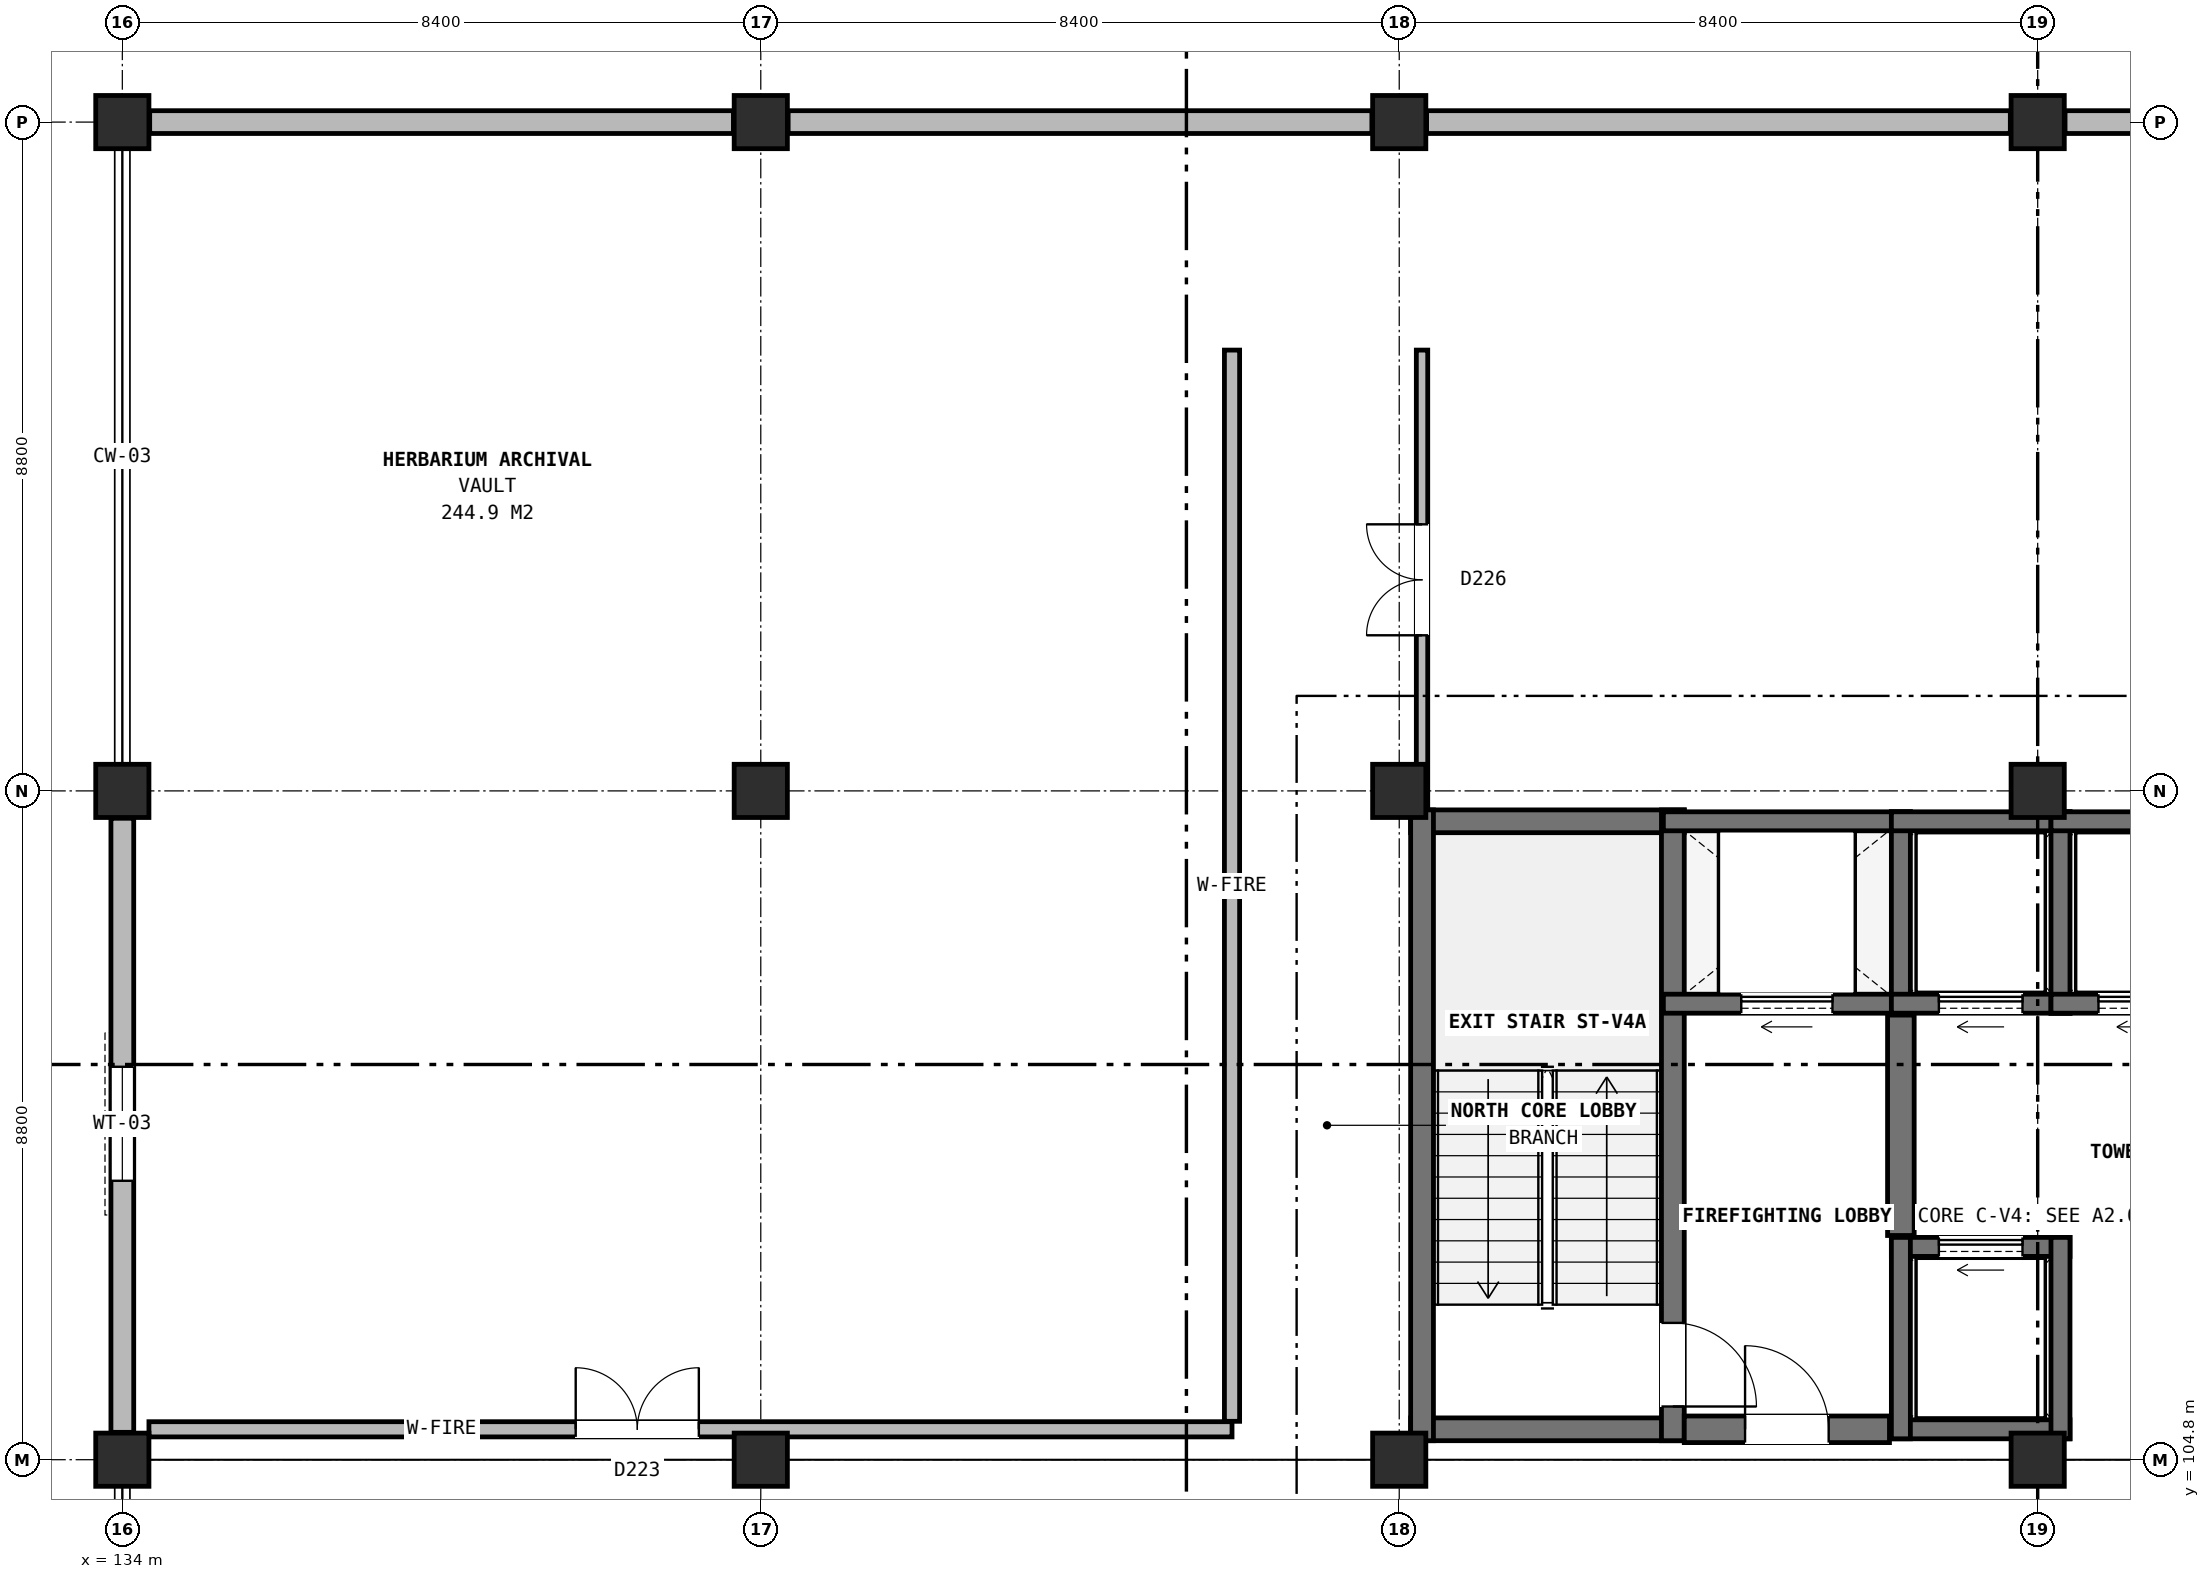
"""IFC4 building model, lengths in metres.
Left out: names, types, materials, properties, quantities, classifications, styles, units other than length and angle.
Written with IfcOpenShell. Run it as: python <this file> out.ifc"""

import sys

from ifc_helpers import new_model, si_unit, direction, frame, frame_2d, origin, origin_2d, place, context, subcontext, project, spatial, rectangle, extrude, element, fill, save


model = new_model("IFC4")
c1 = context("Model", 3, precision=1e-05, world=origin(), true_north=direction((0.0, 1.0)))
c2 = subcontext(c1, "Body", "Model", "MODEL_VIEW")
j1 = project(units=[si_unit("LENGTHUNIT", "METRE"), si_unit("PLANEANGLEUNIT", "RADIAN")], contexts=[c1])
p1 = place(None, origin())
s1 = spatial("IfcSite", under=j1, at=p1, CompositionType="ELEMENT")
p2 = place(p1, origin())
s2 = spatial("IfcBuilding", under=s1, at=p2, CompositionType="ELEMENT")
p3 = place(p2, frame((0.0, 0.0, 28.8)))
s3 = spatial("IfcBuildingStorey", under=s2, at=p3, CompositionType="ELEMENT", Elevation=28.8)
for number, where, z_axis, x_axis in (
    (1, (134.0, 104.8, 0.0), (0.0, 0.0, 1.0), (1.0, 0.0, 0.0)),
    (2, (134.0, 113.6, 0.0), (0.0, 0.0, 1.0), (1.0, 0.0, 0.0)),
    (3, (134.0, 122.4, 0.0), (0.0, 0.0, 1.0), (1.0, 0.0, 0.0)),
    (4, (142.4, 104.8, 0.0), (0.0, 0.0, 1.0), (1.0, 0.0, 0.0)),
    (5, (142.4, 113.6, 0.0), (0.0, 0.0, 1.0), (1.0, 0.0, 0.0)),
    (6, (142.4, 122.4, 0.0), (0.0, 0.0, 1.0), (1.0, 0.0, 0.0)),
    (7, (150.8, 104.8, 0.0), (0.0, 0.0, 1.0), (1.0, 0.0, 0.0)),
    (8, (150.8, 113.6, 0.0), (0.0, 0.0, 1.0), (1.0, 0.0, 0.0)),
    (9, (150.8, 122.4, 0.0), (0.0, 0.0, 1.0), (1.0, 0.0, 0.0)),
    (10, (159.2, 104.8, 0.0), (0.0, 0.0, 1.0), (1.0, 0.0, 0.0)),
    (11, (159.2, 113.6, 0.0), (0.0, 0.0, 1.0), (1.0, 0.0, 0.0)),
    (12, (159.2, 122.4, 0.0), (0.0, 0.0, 1.0), (1.0, 0.0, 0.0)),
):
    element("IfcColumn", number, at=place(p3, frame(where, z_axis=z_axis, x_axis=x_axis)), inside=s3, PredefinedType="COLUMN", context=c2, shape_type="SweptSolid", body=[
        extrude(rectangle(XDim=0.7, YDim=0.7, at=origin_2d()), origin(), (0.0, 0.0, 1.0), 4.0),
    ])
p4 = place(p3, frame((167.24, 122.4, 0.0), z_axis=(0.0, 0.0, 1.0), x_axis=(-1.0, 0.0, 0.0)))
e13 = element("IfcWall", 13, at=p4, inside=s3, PredefinedType="SOLIDWALL", context=c2, shape_type="SweptSolid", body=[
    extrude(rectangle(XDim=7.68, YDim=0.3, at=frame_2d((3.84, 0.0))), origin(), (0.0, 0.0, 1.0), 3.15),
])
p5 = place(p3, frame((158.84, 122.4, 0.0), z_axis=(0.0, 0.0, 1.0), x_axis=(-1.0, 0.0, 0.0)))
e14 = element("IfcWall", 14, at=p5, inside=s3, PredefinedType="SOLIDWALL", context=c2, shape_type="SweptSolid", body=[
    extrude(rectangle(XDim=7.68, YDim=0.3, at=frame_2d((3.84, 0.0))), origin(), (0.0, 0.0, 1.0), 3.15),
])
for number, where, z_axis, x_axis in (
    (15, (150.44, 122.4, 0.0), (0.0, 0.0, 1.0), (-1.0, 0.0, 0.0)),
    (16, (142.04, 122.4, 0.0), (0.0, 0.0, 1.0), (-1.0, 0.0, 0.0)),
):
    element("IfcWall", number, at=place(p3, frame(where, z_axis=z_axis, x_axis=x_axis)), inside=s3, PredefinedType="SOLIDWALL", context=c2, shape_type="SweptSolid", body=[
        extrude(rectangle(XDim=7.68, YDim=0.3, at=frame_2d((3.84, 0.0))), origin(), (0.0, 0.0, 1.0), 3.15),
    ])
p6 = place(p3, frame((134.0, 113.24, 0.0), z_axis=(0.0, 0.0, 1.0), x_axis=(0.0, -1.0, 0.0)))
e17 = element("IfcWall", 17, at=p6, inside=s3, PredefinedType="SOLIDWALL", context=c2, shape_type="SweptSolid", body=[
    extrude(rectangle(XDim=8.08, YDim=0.3, at=frame_2d((4.04, 0.0))), origin(), (0.0, 0.0, 1.0), 3.15),
])
p7 = place(p6, frame((3.27, 0.0, 0.9)))
e18 = element("IfcOpeningElement", 18, at=p7, cuts=e17, PredefinedType="OPENING", context=c2, shape_type="SweptSolid", body=[
    extrude(rectangle(XDim=1.5, YDim=1.8, at=frame_2d((0.75, 0.9))), frame((0.0, 0.16, 0.0), z_axis=(0.0, -1.0, 0.0), x_axis=(1.0, 0.0, 0.0)), (0.0, 0.0, 1.0), 0.32),
])
for number, where, z_axis, x_axis in (
    (19, (150.95, 105.2, 0.0), (0.0, 0.0, 1.0), (1.0, 0.0, 0.0)),
    (20, (150.95, 113.2, 0.0), (0.0, 0.0, 1.0), (1.0, 0.0, 0.0)),
):
    element("IfcWall", number, at=place(p3, frame(where, z_axis=z_axis, x_axis=x_axis)), inside=s3, PredefinedType="SHEAR", context=c2, shape_type="SweptSolid", body=[
        extrude(rectangle(XDim=3.6, YDim=0.3, at=frame_2d((1.8, 0.0))), origin(), (0.0, 0.0, 1.0), 4.0),
    ])
p8 = place(p3, frame((151.1, 105.05, 0.0), z_axis=(0.0, 0.0, 1.0), x_axis=(0.0, 1.0, 0.0)))
e21 = element("IfcWall", 21, at=p8, inside=s3, PredefinedType="SHEAR", context=c2, shape_type="SweptSolid", body=[
    extrude(rectangle(XDim=8.3, YDim=0.3, at=frame_2d((4.15, 0.0))), origin(), (0.0, 0.0, 1.0), 4.0),
])
p9 = place(p3, frame((154.4, 105.05, 0.0), z_axis=(0.0, 0.0, 1.0), x_axis=(0.0, 1.0, 0.0)))
e22 = element("IfcWall", 22, at=p9, inside=s3, PredefinedType="SHEAR", context=c2, shape_type="SweptSolid", body=[
    extrude(rectangle(XDim=8.3, YDim=0.3, at=frame_2d((4.15, 0.0))), origin(), (0.0, 0.0, 1.0), 4.0),
])
p10 = place(p9, frame((0.45, 0.0, 0.0)))
e23 = element("IfcOpeningElement", 23, at=p10, cuts=e22, PredefinedType="OPENING", context=c2, shape_type="SweptSolid", body=[
    extrude(rectangle(XDim=1.1, YDim=2.2, at=frame_2d((0.55, 1.1))), frame((0.0, 0.16, 0.0), z_axis=(0.0, -1.0, 0.0), x_axis=(1.0, 0.0, 0.0)), (0.0, 0.0, 1.0), 0.32),
])
p11 = place(p3, frame((154.275, 110.8, 0.0), z_axis=(0.0, 0.0, 1.0), x_axis=(1.0, 0.0, 0.0)))
e24 = element("IfcWall", 24, at=p11, inside=s3, PredefinedType="SOLIDWALL", context=c2, shape_type="SweptSolid", body=[
    extrude(rectangle(XDim=3.25, YDim=0.25, at=frame_2d((1.625, 0.0))), origin(), (0.0, 0.0, 1.0), 3.68),
])
p12 = place(p11, frame((1.025, 0.0, 0.0)))
e25 = element("IfcOpeningElement", 25, at=p12, cuts=e24, PredefinedType="OPENING", context=c2, shape_type="SweptSolid", body=[
    extrude(rectangle(XDim=1.2, YDim=2.2, at=frame_2d((0.6, 1.1))), frame((0.0, 0.135, 0.0), z_axis=(0.0, -1.0, 0.0), x_axis=(1.0, 0.0, 0.0)), (0.0, 0.0, 1.0), 0.27),
])
p13 = place(p3, frame((154.275, 113.2, 0.0), z_axis=(0.0, 0.0, 1.0), x_axis=(1.0, 0.0, 0.0)))
e26 = element("IfcWall", 26, at=p13, inside=s3, PredefinedType="SOLIDWALL", context=c2, shape_type="SweptSolid", body=[
    extrude(rectangle(XDim=3.25, YDim=0.25, at=frame_2d((1.625, 0.0))), origin(), (0.0, 0.0, 1.0), 3.68),
])
p14 = place(p3, frame((157.4, 110.675, 0.0), z_axis=(0.0, 0.0, 1.0), x_axis=(0.0, 1.0, 0.0)))
e27 = element("IfcWall", 27, at=p14, inside=s3, PredefinedType="SOLIDWALL", context=c2, shape_type="SweptSolid", body=[
    extrude(rectangle(XDim=2.65, YDim=0.25, at=frame_2d((1.325, 0.0))), origin(), (0.0, 0.0, 1.0), 3.68),
])
p15 = place(p3, frame((157.275, 110.8, 0.0), z_axis=(0.0, 0.0, 1.0), x_axis=(1.0, 0.0, 0.0)))
e28 = element("IfcWall", 28, at=p15, inside=s3, PredefinedType="SOLIDWALL", context=c2, shape_type="SweptSolid", body=[
    extrude(rectangle(XDim=2.35, YDim=0.25, at=frame_2d((1.175, 0.0))), origin(), (0.0, 0.0, 1.0), 3.68),
])
p16 = place(p15, frame((0.625, 0.0, 0.0)))
e29 = element("IfcOpeningElement", 29, at=p16, cuts=e28, PredefinedType="OPENING", context=c2, shape_type="SweptSolid", body=[
    extrude(rectangle(XDim=1.1, YDim=2.2, at=frame_2d((0.55, 1.1))), frame((0.0, 0.135, 0.0), z_axis=(0.0, -1.0, 0.0), x_axis=(1.0, 0.0, 0.0)), (0.0, 0.0, 1.0), 0.27),
])
p17 = place(p3, frame((157.275, 113.2, 0.0), z_axis=(0.0, 0.0, 1.0), x_axis=(1.0, 0.0, 0.0)))
e30 = element("IfcWall", 30, at=p17, inside=s3, PredefinedType="SOLIDWALL", context=c2, shape_type="SweptSolid", body=[
    extrude(rectangle(XDim=2.35, YDim=0.25, at=frame_2d((1.175, 0.0))), origin(), (0.0, 0.0, 1.0), 3.68),
])
p18 = place(p3, frame((159.5, 110.675, 0.0), z_axis=(0.0, 0.0, 1.0), x_axis=(0.0, 1.0, 0.0)))
e31 = element("IfcWall", 31, at=p18, inside=s3, PredefinedType="SOLIDWALL", context=c2, shape_type="SweptSolid", body=[
    extrude(rectangle(XDim=2.65, YDim=0.25, at=frame_2d((1.325, 0.0))), origin(), (0.0, 0.0, 1.0), 3.68),
])
p19 = place(p3, frame((159.375, 110.8, 0.0), z_axis=(0.0, 0.0, 1.0), x_axis=(1.0, 0.0, 0.0)))
e32 = element("IfcWall", 32, at=p19, inside=s3, PredefinedType="SOLIDWALL", context=c2, shape_type="SweptSolid", body=[
    extrude(rectangle(XDim=2.35, YDim=0.25, at=frame_2d((1.175, 0.0))), origin(), (0.0, 0.0, 1.0), 3.68),
])
p20 = place(p19, frame((0.625, 0.0, 0.0)))
e33 = element("IfcOpeningElement", 33, at=p20, cuts=e32, PredefinedType="OPENING", context=c2, shape_type="SweptSolid", body=[
    extrude(rectangle(XDim=1.1, YDim=2.2, at=frame_2d((0.55, 1.1))), frame((0.0, 0.135, 0.0), z_axis=(0.0, -1.0, 0.0), x_axis=(1.0, 0.0, 0.0)), (0.0, 0.0, 1.0), 0.27),
])
for number, where, z_axis, x_axis in (
    (34, (159.375, 113.2, 0.0), (0.0, 0.0, 1.0), (1.0, 0.0, 0.0)),
    (35, (157.275, 105.2, 0.0), (0.0, 0.0, 1.0), (1.0, 0.0, 0.0)),
):
    element("IfcWall", number, at=place(p3, frame(where, z_axis=z_axis, x_axis=x_axis)), inside=s3, PredefinedType="SOLIDWALL", context=c2, shape_type="SweptSolid", body=[
        extrude(rectangle(XDim=2.35, YDim=0.25, at=frame_2d((1.175, 0.0))), origin(), (0.0, 0.0, 1.0), 3.68),
    ])
p21 = place(p3, frame((157.275, 107.6, 0.0), z_axis=(0.0, 0.0, 1.0), x_axis=(1.0, 0.0, 0.0)))
e36 = element("IfcWall", 36, at=p21, inside=s3, PredefinedType="SOLIDWALL", context=c2, shape_type="SweptSolid", body=[
    extrude(rectangle(XDim=2.35, YDim=0.25, at=frame_2d((1.175, 0.0))), origin(), (0.0, 0.0, 1.0), 3.68),
])
p22 = place(p21, frame((0.625, 0.0, 0.0)))
e37 = element("IfcOpeningElement", 37, at=p22, cuts=e36, PredefinedType="OPENING", context=c2, shape_type="SweptSolid", body=[
    extrude(rectangle(XDim=1.1, YDim=2.2, at=frame_2d((0.55, 1.1))), frame((0.0, 0.135, 0.0), z_axis=(0.0, -1.0, 0.0), x_axis=(1.0, 0.0, 0.0)), (0.0, 0.0, 1.0), 0.27),
])
for number, where, z_axis, x_axis in (
    (38, (157.4, 105.075, 0.0), (0.0, 0.0, 1.0), (0.0, 1.0, 0.0)),
    (39, (159.5, 105.075, 0.0), (0.0, 0.0, 1.0), (0.0, 1.0, 0.0)),
):
    element("IfcWall", number, at=place(p3, frame(where, z_axis=z_axis, x_axis=x_axis)), inside=s3, PredefinedType="SOLIDWALL", context=c2, shape_type="SweptSolid", body=[
        extrude(rectangle(XDim=2.65, YDim=0.25, at=frame_2d((1.325, 0.0))), origin(), (0.0, 0.0, 1.0), 3.68),
    ])
p23 = place(p3, frame((157.4, 107.75, 0.0), z_axis=(0.0, 0.0, 1.0), x_axis=(0.0, 1.0, 0.0)))
e40 = element("IfcWall", 40, at=p23, inside=s3, PredefinedType="SHEAR", context=c2, shape_type="SweptSolid", body=[
    extrude(rectangle(XDim=2.9, YDim=0.35, at=frame_2d((1.45, 0.0))), origin(), (0.0, 0.0, 1.0), 3.68),
])
p24 = place(p3, frame((154.55, 105.2, 0.0), z_axis=(0.0, 0.0, 1.0), x_axis=(1.0, 0.0, 0.0)))
e41 = element("IfcWall", 41, at=p24, inside=s3, PredefinedType="SHEAR", context=c2, shape_type="SweptSolid", body=[
    extrude(rectangle(XDim=2.7, YDim=0.35, at=frame_2d((1.35, 0.0))), origin(), (0.0, 0.0, 1.0), 3.68),
])
p25 = place(p24, frame((0.8, 0.0, 0.0)))
e42 = element("IfcOpeningElement", 42, at=p25, cuts=e41, PredefinedType="OPENING", context=c2, shape_type="SweptSolid", body=[
    extrude(rectangle(XDim=1.1, YDim=2.2, at=frame_2d((0.55, 1.1))), frame((0.0, 0.185, 0.0), z_axis=(0.0, -1.0, 0.0), x_axis=(1.0, 0.0, 0.0)), (0.0, 0.0, 1.0), 0.37),
])
p26 = place(p3, frame((134.35, 105.2, 0.0), z_axis=(0.0, 0.0, 1.0), x_axis=(1.0, 0.0, 0.0)))
e43 = element("IfcWall", 43, at=p26, inside=s3, PredefinedType="PARTITIONING", context=c2, shape_type="SweptSolid", body=[
    extrude(rectangle(XDim=14.25, YDim=0.2, at=frame_2d((7.125, 0.0))), origin(), (0.0, 0.0, 1.0), 3.145),
])
p27 = place(p26, frame((5.615, 0.0, 0.0)))
e44 = element("IfcOpeningElement", 44, at=p27, cuts=e43, PredefinedType="OPENING", context=c2, shape_type="SweptSolid", body=[
    extrude(rectangle(XDim=1.62, YDim=2.25, at=frame_2d((0.81, 1.125))), frame((0.0, 0.11, 0.0), z_axis=(0.0, -1.0, 0.0), x_axis=(1.0, 0.0, 0.0)), (0.0, 0.0, 1.0), 0.22),
])
p28 = place(p3, frame((148.6, 105.305, 0.0), z_axis=(0.0, 0.0, 1.0), x_axis=(0.0, 1.0, 0.0)))
e45 = element("IfcWall", 45, at=p28, inside=s3, PredefinedType="PARTITIONING", context=c2, shape_type="SweptSolid", body=[
    extrude(rectangle(XDim=14.095, YDim=0.2, at=frame_2d((7.047, 0.0))), origin(), (0.0, 0.0, 1.0), 3.665),
])
p29 = place(p3, frame((151.1, 113.355, 0.0), z_axis=(0.0, 0.0, 1.0), x_axis=(0.0, 1.0, 0.0)))
e46 = element("IfcWall", 46, at=p29, inside=s3, PredefinedType="PARTITIONING", context=c2, shape_type="SweptSolid", body=[
    extrude(rectangle(XDim=6.045, YDim=0.15, at=frame_2d((3.022, 0.0))), origin(), (0.0, 0.0, 1.0), 3.145),
])
p30 = place(p29, frame((2.292, 0.0, 0.0)))
e47 = element("IfcOpeningElement", 47, at=p30, cuts=e46, PredefinedType="OPENING", context=c2, shape_type="SweptSolid", body=[
    extrude(rectangle(XDim=1.46, YDim=2.28, at=frame_2d((0.73, 1.14))), frame((0.0, 0.085, 0.0), z_axis=(0.0, -1.0, 0.0), x_axis=(1.0, 0.0, 0.0)), (0.0, 0.0, 1.0), 0.17),
])
p31 = place(p7, origin())
e48 = element("IfcWindow", 48, at=p31, inside=s3, PartitioningType="SINGLE_PANEL", PredefinedType="WINDOW", context=c2, shape_type="SweptSolid", body=[
    extrude(rectangle(XDim=1.5, YDim=1.8, at=frame_2d((0.75, 0.9))), frame((0.0, 0.03, 0.0), z_axis=(0.0, -1.0, 0.0), x_axis=(1.0, 0.0, 0.0)), (0.0, 0.0, 1.0), 0.06),
])
fill(e18, e48)
p32 = place(p10, frame((1.1, 0.0, 0.0), z_axis=(0.0, 0.0, 1.0), x_axis=(-1.0, 0.0, 0.0)))
e49 = element("IfcDoor", 49, at=p32, inside=s3, OperationType="SINGLE_SWING_LEFT", PredefinedType="DOOR", context=c2, shape_type="SweptSolid", body=[
    extrude(rectangle(XDim=1.1, YDim=2.2, at=frame_2d((0.55, 1.1))), frame((0.0, 0.025, 0.0), z_axis=(0.0, -1.0, 0.0), x_axis=(1.0, 0.0, 0.0)), (0.0, 0.0, 1.0), 0.05),
])
fill(e23, e49)
p33 = place(p12, origin())
e50 = element("IfcDoor", 50, at=p33, inside=s3, OperationType="SLIDING_TO_LEFT", PredefinedType="DOOR", context=c2, shape_type="SweptSolid", body=[
    extrude(rectangle(XDim=1.2, YDim=2.2, at=frame_2d((0.6, 1.1))), frame((0.0, 0.025, 0.0), z_axis=(0.0, -1.0, 0.0), x_axis=(1.0, 0.0, 0.0)), (0.0, 0.0, 1.0), 0.05),
])
fill(e25, e50)
p34 = place(p16, origin())
e51 = element("IfcDoor", 51, at=p34, inside=s3, OperationType="SLIDING_TO_LEFT", PredefinedType="DOOR", context=c2, shape_type="SweptSolid", body=[
    extrude(rectangle(XDim=1.1, YDim=2.2, at=frame_2d((0.55, 1.1))), frame((0.0, 0.025, 0.0), z_axis=(0.0, -1.0, 0.0), x_axis=(1.0, 0.0, 0.0)), (0.0, 0.0, 1.0), 0.05),
])
fill(e29, e51)
p35 = place(p20, origin())
e52 = element("IfcDoor", 52, at=p35, inside=s3, OperationType="SLIDING_TO_LEFT", PredefinedType="DOOR", context=c2, shape_type="SweptSolid", body=[
    extrude(rectangle(XDim=1.1, YDim=2.2, at=frame_2d((0.55, 1.1))), frame((0.0, 0.025, 0.0), z_axis=(0.0, -1.0, 0.0), x_axis=(1.0, 0.0, 0.0)), (0.0, 0.0, 1.0), 0.05),
])
fill(e33, e52)
p36 = place(p22, origin())
e53 = element("IfcDoor", 53, at=p36, inside=s3, OperationType="SLIDING_TO_LEFT", PredefinedType="DOOR", context=c2, shape_type="SweptSolid", body=[
    extrude(rectangle(XDim=1.1, YDim=2.2, at=frame_2d((0.55, 1.1))), frame((0.0, 0.025, 0.0), z_axis=(0.0, -1.0, 0.0), x_axis=(1.0, 0.0, 0.0)), (0.0, 0.0, 1.0), 0.05),
])
fill(e37, e53)
p37 = place(p25, origin())
e54 = element("IfcDoor", 54, at=p37, inside=s3, OperationType="SINGLE_SWING_LEFT", PredefinedType="DOOR", context=c2, shape_type="SweptSolid", body=[
    extrude(rectangle(XDim=1.1, YDim=2.2, at=frame_2d((0.55, 1.1))), frame((0.0, 0.025, 0.0), z_axis=(0.0, -1.0, 0.0), x_axis=(1.0, 0.0, 0.0)), (0.0, 0.0, 1.0), 0.05),
])
fill(e42, e54)
p38 = place(p27, origin())
e55 = element("IfcDoor", 55, at=p38, inside=s3, OperationType="DOUBLE_DOOR_SINGLE_SWING", PredefinedType="DOOR", context=c2, shape_type="SweptSolid", body=[
    extrude(rectangle(XDim=1.62, YDim=2.25, at=frame_2d((0.81, 1.125))), frame((0.0, 0.025, 0.0), z_axis=(0.0, -1.0, 0.0), x_axis=(1.0, 0.0, 0.0)), (0.0, 0.0, 1.0), 0.05),
])
fill(e44, e55)
p39 = place(p30, origin())
e56 = element("IfcDoor", 56, at=p39, inside=s3, OperationType="DOUBLE_DOOR_SINGLE_SWING", PredefinedType="DOOR", context=c2, shape_type="SweptSolid", body=[
    extrude(rectangle(XDim=1.46, YDim=2.28, at=frame_2d((0.73, 1.14))), frame((0.0, 0.025, 0.0), z_axis=(0.0, -1.0, 0.0), x_axis=(1.0, 0.0, 0.0)), (0.0, 0.0, 1.0), 0.05),
])
fill(e47, e56)
save(model, sys.argv[1])
